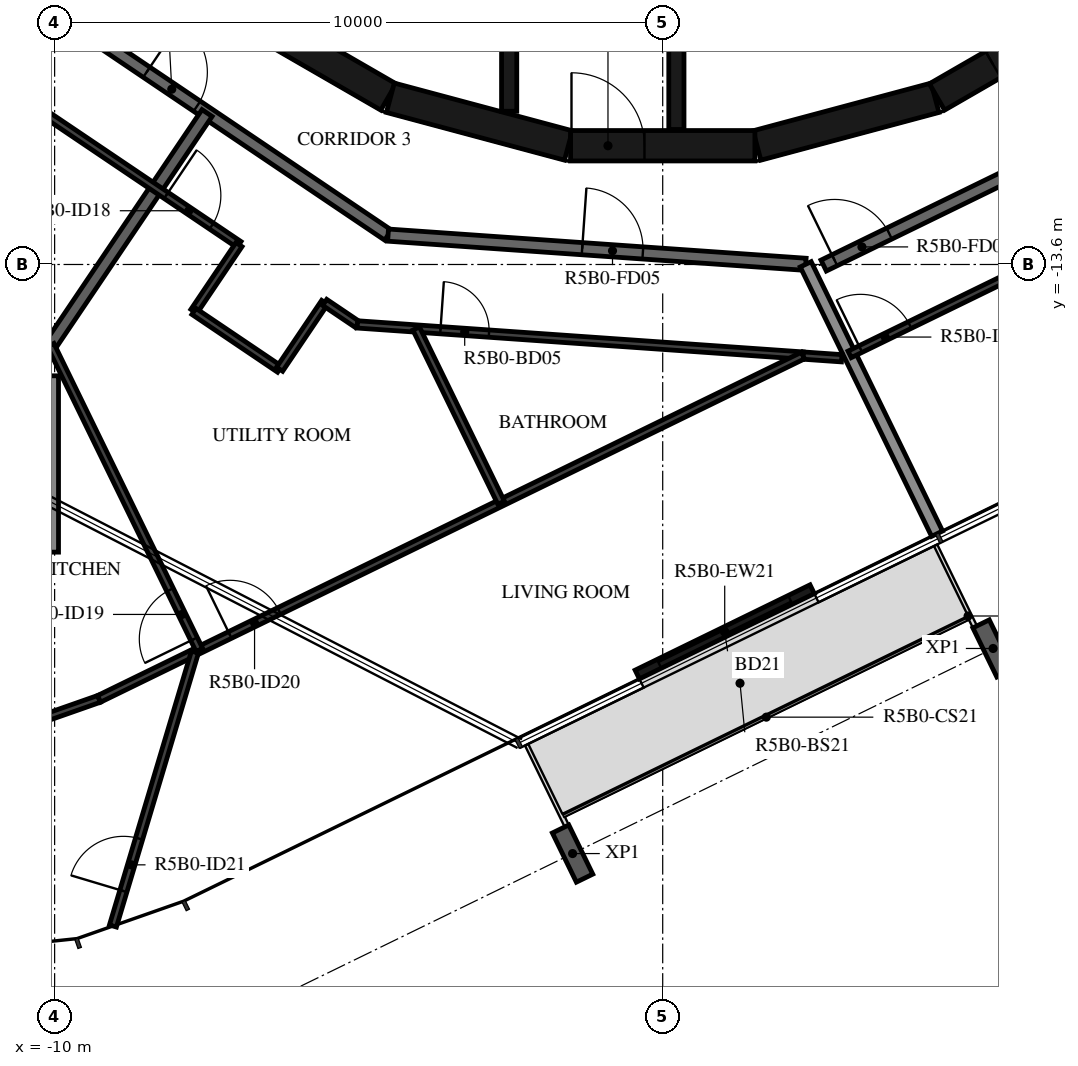
"""IFC4 building model, lengths in metres.
Left out: names, types, materials, properties, quantities, classifications, styles, units other than length and angle.
Written with IfcOpenShell. Run it as: python <this file> out.ifc"""

import sys

from ifc_helpers import new_model, si_unit, direction, frame, frame_2d, origin, origin_2d, place, context, subcontext, project, spatial, polyline, rectangle, i_section, outline, extrude, element, fill, save


model = new_model("IFC4")
c1 = context("Model", 3, precision=1e-05, world=origin(), true_north=direction((0.0, 1.0)))
c2 = subcontext(c1, "Body", "Model", "MODEL_VIEW")
j1 = project(units=[si_unit("LENGTHUNIT", "METRE"), si_unit("PLANEANGLEUNIT", "RADIAN")], contexts=[c1])
p1 = place(None, origin())
s1 = spatial("IfcSite", under=j1, at=p1, CompositionType="ELEMENT")
p2 = place(p1, origin())
s2 = spatial("IfcBuilding", under=s1, at=p2, CompositionType="ELEMENT")
p3 = place(p2, frame((0.0, 0.0, 202.4)))
s3 = spatial("IfcBuildingStorey", under=s2, at=p3, CompositionType="ELEMENT", Elevation=202.4)
for number, where, z_axis, x_axis in (
    (1, (-1.482, -23.287, -0.38), (0.0, 0.0, 1.0), (-0.899, -0.438, 0.0)),
    (2, (5.433, -19.915, -0.38), (0.0, 0.0, 1.0), (-0.899, -0.438, 0.0)),
):
    element("IfcColumn", number, at=place(p3, frame(where, z_axis=z_axis, x_axis=x_axis)), inside=s3, PredefinedType="COLUMN", context=c2, shape_type="SweptSolid", body=[
        extrude(i_section(OverallWidth=0.3, OverallDepth=0.9, WebThickness=0.019, FlangeThickness=0.035, FilletRadius=0.03, at=origin_2d()), origin(), (0.0, 0.0, 1.0), 3.5),
    ])
p4 = place(p3, frame((-0.418, -20.343, 0.0), z_axis=(0.0, 0.0, 1.0), x_axis=(0.898778711213, 0.43840258698, 0.0)))
e3 = element("IfcWall", 3, at=p4, inside=s3, PredefinedType="STANDARD", context=c2, shape_type="SweptSolid", body=[
    extrude(rectangle(XDim=3.2, YDim=0.16, at=frame_2d((1.6, 0.0))), origin(), (0.0, 0.0, 1.0), 3.12),
])
p5 = place(p4, frame((0.4, 0.0, 0.0)))
e4 = element("IfcOpeningElement", 4, at=p5, cuts=e3, PredefinedType="OPENING", context=c2, shape_type="SweptSolid", body=[
    extrude(rectangle(XDim=2.4, YDim=2.4, at=frame_2d((1.2, 1.2))), frame((0.0, 0.09, 0.0), z_axis=(0.0, -1.0, 0.0), x_axis=(1.0, 0.0, 0.0)), (0.0, 0.0, 1.0), 0.18),
])
p6 = place(p3, frame((1.55, -11.643, 0.0), z_axis=(0.0, 0.0, 1.0), x_axis=(0.965948410781, 0.258734743916, 0.0)))
e5 = element("IfcWall", 5, at=p6, inside=s3, PredefinedType="SHEAR", context=c2, shape_type="SweptSolid", body=[
    extrude(rectangle(XDim=3.033, YDim=0.5, at=frame_2d((1.516, 0.0))), origin(), (0.0, 0.0, 1.0), 3.12),
])
p7 = place(p3, frame((4.51, -10.845, 0.0), z_axis=(0.0, 0.0, 1.0), x_axis=(0.865975092491, 0.500087131594, 0.0)))
e6 = element("IfcWall", 6, at=p7, inside=s3, PredefinedType="SHEAR", context=c2, shape_type="SweptSolid", body=[
    extrude(rectangle(XDim=3.033, YDim=0.5, at=frame_2d((1.516, 0.0))), origin(), (0.0, 0.0, 1.0), 3.12),
])
p8 = place(p7, frame((1.066, 0.0, 0.0)))
e7 = element("IfcOpeningElement", 7, at=p8, cuts=e6, PredefinedType="OPENING", context=c2, shape_type="SweptSolid", body=[
    extrude(rectangle(XDim=0.9, YDim=2.1, at=frame_2d((0.45, 1.05))), frame((0.0, 0.26, 0.0), z_axis=(0.0, -1.0, 0.0), x_axis=(1.0, 0.0, 0.0)), (0.0, 0.0, 1.0), 0.52),
])
for number, where, z_axis, x_axis in (
    (8, (-7.137, -9.329, 0.0), (0.0, 0.0, 1.0), (0.866, -0.5, 0.0)),
    (9, (-4.479, -10.858, 0.0), (0.0, 0.0, 1.0), (0.966, -0.259, 0.0)),
):
    element("IfcWall", number, at=place(p3, frame(where, z_axis=z_axis, x_axis=x_axis)), inside=s3, PredefinedType="SHEAR", context=c2, shape_type="SweptSolid", body=[
        extrude(rectangle(XDim=3.033, YDim=0.5, at=frame_2d((1.516, 0.0))), origin(), (0.0, 0.0, 1.0), 3.12),
    ])
p9 = place(p3, frame((-1.516, -11.647, 0.0), z_axis=(0.0, 0.0, 1.0), x_axis=(1.0, 0.0, 0.0)))
e10 = element("IfcWall", 10, at=p9, inside=s3, PredefinedType="SHEAR", context=c2, shape_type="SweptSolid", body=[
    extrude(rectangle(XDim=3.033, YDim=0.5, at=frame_2d((1.516, 0.0))), origin(), (0.0, 0.0, 1.0), 3.12),
])
p10 = place(p9, frame((0.016, 0.0, 0.0)))
e11 = element("IfcOpeningElement", 11, at=p10, cuts=e10, PredefinedType="OPENING", context=c2, shape_type="SweptSolid", body=[
    extrude(rectangle(XDim=1.2, YDim=2.1, at=frame_2d((0.6, 1.05))), frame((0.0, 0.26, 0.0), z_axis=(0.0, -1.0, 0.0), x_axis=(1.0, 0.0, 0.0)), (0.0, 0.0, 1.0), 0.52),
])
p11 = place(p3, frame((-2.525, -8.97, 0.0), z_axis=(0.0, 0.0, 1.0), x_axis=(0.0, -1.0, 0.0)))
e12 = element("IfcWall", 12, at=p11, inside=s3, PredefinedType="SHEAR", context=c2, shape_type="SweptSolid", body=[
    extrude(rectangle(XDim=2.11, YDim=0.25, at=frame_2d((1.055, 0.0))), origin(), (0.0, 0.0, 1.0), 3.12),
])
p12 = place(p3, frame((0.225, -8.97, 0.0), z_axis=(0.0, 0.0, 1.0), x_axis=(0.0, -1.0, 0.0)))
e13 = element("IfcWall", 13, at=p12, inside=s3, PredefinedType="SHEAR", context=c2, shape_type="SweptSolid", body=[
    extrude(rectangle(XDim=2.41, YDim=0.25, at=frame_2d((1.205, 0.0))), origin(), (0.0, 0.0, 1.0), 3.12),
])
p13 = place(p3, frame((-10.47, -9.101, 0.0), z_axis=(0.0, 0.0, 1.0), x_axis=(0.829035841718, -0.559195469534, 0.0)))
e14 = element("IfcWall", 14, at=p13, inside=s3, PredefinedType="STANDARD", context=c2, shape_type="SweptSolid", body=[
    extrude(rectangle(XDim=7.181, YDim=0.2, at=frame_2d((3.591, 0.0))), origin(), (0.0, 0.0, 1.0), 3.12),
])
p14 = place(p13, frame((2.39, 0.0, 0.0)))
e15 = element("IfcOpeningElement", 15, at=p14, cuts=e14, PredefinedType="OPENING", context=c2, shape_type="SweptSolid", body=[
    extrude(rectangle(XDim=1.0, YDim=2.1, at=frame_2d((0.5, 1.05))), frame((0.0, 0.11, 0.0), z_axis=(0.0, -1.0, 0.0), x_axis=(1.0, 0.0, 0.0)), (0.0, 0.0, 1.0), 0.22),
])
p15 = place(p3, frame((-4.517, -13.117, 0.0), z_axis=(0.0, 0.0, 1.0), x_axis=(0.997564669554, -0.069747616856, 0.0)))
e16 = element("IfcWall", 16, at=p15, inside=s3, PredefinedType="STANDARD", context=c2, shape_type="SweptSolid", body=[
    extrude(rectangle(XDim=6.885, YDim=0.2, at=frame_2d((3.443, 0.0))), origin(), (0.0, 0.0, 1.0), 3.12),
])
p16 = place(p15, frame((3.2, 0.0, 0.0)))
e17 = element("IfcOpeningElement", 17, at=p16, cuts=e16, PredefinedType="OPENING", context=c2, shape_type="SweptSolid", body=[
    extrude(rectangle(XDim=1.0, YDim=2.1, at=frame_2d((0.5, 1.05))), frame((0.0, 0.11, 0.0), z_axis=(0.0, -1.0, 0.0), x_axis=(1.0, 0.0, 0.0)), (0.0, 0.0, 1.0), 0.22),
])
p17 = place(p3, frame((2.647, -13.618, 0.0), z_axis=(0.0, 0.0, 1.0), x_axis=(0.898796543751, 0.438366026218, 0.0)))
e18 = element("IfcWall", 18, at=p17, inside=s3, PredefinedType="STANDARD", context=c2, shape_type="SweptSolid", body=[
    extrude(rectangle(XDim=7.181, YDim=0.2, at=frame_2d((3.591, 0.0))), origin(), (0.0, 0.0, 1.0), 3.12),
])
p18 = place(p17, frame((0.2, 0.0, 0.0)))
e19 = element("IfcOpeningElement", 19, at=p18, cuts=e18, PredefinedType="OPENING", context=c2, shape_type="SweptSolid", body=[
    extrude(rectangle(XDim=1.0, YDim=2.1, at=frame_2d((0.5, 1.05))), frame((0.0, 0.11, 0.0), z_axis=(0.0, -1.0, 0.0), x_axis=(1.0, 0.0, 0.0)), (0.0, 0.0, 1.0), 0.22),
])
p19 = place(p3, frame((-10.066, -14.924, 0.0), z_axis=(0.0, 0.0, 1.0), x_axis=(0.559173899945, 0.829050390278, 0.0)))
e20 = element("IfcWall", 20, at=p19, inside=s3, PredefinedType="STANDARD", context=c2, shape_type="SweptSolid", body=[
    extrude(rectangle(XDim=4.601, YDim=0.2, at=frame_2d((2.301, 0.0))), origin(), (0.0, 0.0, 1.0), 3.12),
])
p20 = place(p3, frame((-10.408, -15.43, 0.0), z_axis=(0.0, 0.0, 1.0), x_axis=(0.559390561924, 0.828904215956, 0.0)))
e21 = element("IfcWall", 21, at=p20, inside=s3, PredefinedType="STANDARD", context=c2, shape_type="SweptSolid", body=[
    extrude(rectangle(XDim=0.612, YDim=0.2, at=frame_2d((0.306, 0.0))), origin(), (0.0, 0.0, 1.0), 3.12),
])
p21 = place(p3, frame((4.512, -18.027, 0.0), z_axis=(0.0, 0.0, 1.0), x_axis=(-0.438374835386, 0.898792247241, 0.0)))
e22 = element("IfcWall", 22, at=p21, inside=s3, PredefinedType="STANDARD", context=c2, shape_type="SweptSolid", body=[
    extrude(rectangle(XDim=4.929, YDim=0.2, at=frame_2d((2.464, 0.0))), origin(), (0.0, 0.0, 1.0), 2.73),
])
p22 = place(p3, frame((-11.642, -10.12, 0.0), z_axis=(0.0, 0.0, 1.0), x_axis=(0.829033377599, -0.559199122698, 0.0)))
e23 = element("IfcWall", 23, at=p22, inside=s3, PredefinedType="PARTITIONING", context=c2, shape_type="SweptSolid", body=[
    extrude(rectangle(XDim=5.638, YDim=0.12, at=frame_2d((2.819, 0.0))), origin(), (0.0, 0.0, 1.0), 3.12),
])
p23 = place(p22, frame((0.2, 0.0, 0.0)))
e24 = element("IfcOpeningElement", 24, at=p23, cuts=e23, PredefinedType="OPENING", context=c2, shape_type="SweptSolid", body=[
    extrude(rectangle(XDim=0.9, YDim=2.1, at=frame_2d((0.45, 1.05))), frame((0.0, 0.07, 0.0), z_axis=(0.0, -1.0, 0.0), x_axis=(1.0, 0.0, 0.0)), (0.0, 0.0, 1.0), 0.14),
])
p24 = place(p22, frame((4.192, 0.0, 0.0)))
e25 = element("IfcOpeningElement", 25, at=p24, cuts=e23, PredefinedType="OPENING", context=c2, shape_type="SweptSolid", body=[
    extrude(rectangle(XDim=0.9, YDim=2.1, at=frame_2d((0.45, 1.05))), frame((0.0, 0.07, 0.0), z_axis=(0.0, -1.0, 0.0), x_axis=(1.0, 0.0, 0.0)), (0.0, 0.0, 1.0), 0.14),
])
p25 = place(p3, frame((-6.968, -13.273, 0.0), z_axis=(0.0, 0.0, 1.0), x_axis=(-0.559283007371, -0.828976789582, 0.0)))
e26 = element("IfcWall", 26, at=p25, inside=s3, PredefinedType="PARTITIONING", context=c2, shape_type="SweptSolid", body=[
    extrude(rectangle(XDim=1.325, YDim=0.12, at=frame_2d((0.663, 0.0))), origin(), (0.0, 0.0, 1.0), 3.12),
])
p26 = place(p3, frame((-7.709, -14.371, 0.0), z_axis=(0.0, 0.0, 1.0), x_axis=(0.829033422808, -0.559199055675, 0.0)))
e27 = element("IfcWall", 27, at=p26, inside=s3, PredefinedType="PARTITIONING", context=c2, shape_type="SweptSolid", body=[
    extrude(rectangle(XDim=1.7, YDim=0.12, at=frame_2d((0.85, 0.0))), origin(), (0.0, 0.0, 1.0), 3.12),
])
p27 = place(p3, frame((-6.3, -15.322, 0.0), z_axis=(0.0, 0.0, 1.0), x_axis=(0.559197608403, 0.829034399019, 0.0)))
e28 = element("IfcWall", 28, at=p27, inside=s3, PredefinedType="PARTITIONING", context=c2, shape_type="SweptSolid", body=[
    extrude(rectangle(XDim=1.325, YDim=0.12, at=frame_2d((0.663, 0.0))), origin(), (0.0, 0.0, 1.0), 3.12),
])
p28 = place(p3, frame((-5.559, -14.223, 0.0), z_axis=(0.0, 0.0, 1.0), x_axis=(0.828844300469, -0.559479334363, 0.0)))
e29 = element("IfcWall", 29, at=p28, inside=s3, PredefinedType="PARTITIONING", context=c2, shape_type="SweptSolid", body=[
    extrude(rectangle(XDim=0.647, YDim=0.12, at=frame_2d((0.324, 0.0))), origin(), (0.0, 0.0, 1.0), 3.12),
])
p29 = place(p3, frame((-5.022, -14.585, 0.0), z_axis=(0.0, 0.0, 1.0), x_axis=(0.997564196041, -0.06975438895, 0.0)))
e30 = element("IfcWall", 30, at=p29, inside=s3, PredefinedType="PARTITIONING", context=c2, shape_type="SweptSolid", body=[
    extrude(rectangle(XDim=7.346, YDim=0.12, at=frame_2d((3.673, 0.0))), origin(), (0.0, 0.0, 1.0), 3.12),
])
p30 = place(p29, frame((1.37, 0.0, 0.0)))
e31 = element("IfcOpeningElement", 31, at=p30, cuts=e30, PredefinedType="OPENING", context=c2, shape_type="SweptSolid", body=[
    extrude(rectangle(XDim=0.8, YDim=2.1, at=frame_2d((0.4, 1.05))), frame((0.0, 0.07, 0.0), z_axis=(0.0, -1.0, 0.0), x_axis=(1.0, 0.0, 0.0)), (0.0, 0.0, 1.0), 0.14),
])
p31 = place(p3, frame((2.306, -15.098, 0.0), z_axis=(0.0, 0.0, 1.0), x_axis=(0.99757571817, -0.069589413839, 0.0)))
e32 = element("IfcWall", 32, at=p31, inside=s3, PredefinedType="PARTITIONING", context=c2, shape_type="SweptSolid", body=[
    extrude(rectangle(XDim=0.638, YDim=0.12, at=frame_2d((0.319, 0.0))), origin(), (0.0, 0.0, 1.0), 3.12),
])
p32 = place(p3, frame((-10.427, -21.149, 0.0), z_axis=(0.0, 0.0, 1.0), x_axis=(0.943591256744, 0.331112579338, 0.0)))
e33 = element("IfcWall", 33, at=p32, inside=s3, PredefinedType="PARTITIONING", context=c2, shape_type="SweptSolid", body=[
    extrude(rectangle(XDim=1.227, YDim=0.12, at=frame_2d((0.613, 0.0))), origin(), (0.0, 0.0, 1.0), 3.12),
])
p33 = place(p3, frame((-9.269, -20.743, 0.0), z_axis=(0.0, 0.0, 1.0), x_axis=(0.898796865831, 0.438365365846, 0.0)))
e34 = element("IfcWall", 34, at=p33, inside=s3, PredefinedType="PARTITIONING", context=c2, shape_type="SweptSolid", body=[
    extrude(rectangle(XDim=12.879, YDim=0.12, at=frame_2d((6.439, 0.0))), origin(), (0.0, 0.0, 1.0), 3.12),
])
p34 = place(p33, frame((2.395, 0.0, 0.0)))
e35 = element("IfcOpeningElement", 35, at=p34, cuts=e34, PredefinedType="OPENING", context=c2, shape_type="SweptSolid", body=[
    extrude(rectangle(XDim=0.9, YDim=2.1, at=frame_2d((0.45, 1.05))), frame((0.0, 0.07, 0.0), z_axis=(0.0, -1.0, 0.0), x_axis=(1.0, 0.0, 0.0)), (0.0, 0.0, 1.0), 0.14),
])
p35 = place(p3, frame((-7.62, -19.939, 0.0), z_axis=(0.0, 0.0, 1.0), x_axis=(-0.438353807908, 0.89880250283, 0.0)))
e36 = element("IfcWall", 36, at=p35, inside=s3, PredefinedType="PARTITIONING", context=c2, shape_type="SweptSolid", body=[
    extrude(rectangle(XDim=5.58, YDim=0.12, at=frame_2d((2.79, 0.0))), origin(), (0.0, 0.0, 1.0), 3.12),
])
p36 = place(p35, frame((0.2, 0.0, 0.0)))
e37 = element("IfcOpeningElement", 37, at=p36, cuts=e36, PredefinedType="OPENING", context=c2, shape_type="SweptSolid", body=[
    extrude(rectangle(XDim=0.9, YDim=2.1, at=frame_2d((0.45, 1.05))), frame((0.0, 0.07, 0.0), z_axis=(0.0, -1.0, 0.0), x_axis=(1.0, 0.0, 0.0)), (0.0, 0.0, 1.0), 0.14),
])
p37 = place(p3, frame((-9.041, -24.479, 0.0), z_axis=(0.0, 0.0, 1.0), x_axis=(0.286804727102, 0.957989064923, 0.0)))
e38 = element("IfcWall", 38, at=p37, inside=s3, PredefinedType="PARTITIONING", context=c2, shape_type="SweptSolid", body=[
    extrude(rectangle(XDim=4.701, YDim=0.12, at=frame_2d((2.351, 0.0))), origin(), (0.0, 0.0, 1.0), 3.12),
])
p38 = place(p37, frame((0.6, 0.0, 0.0)))
e39 = element("IfcOpeningElement", 39, at=p38, cuts=e38, PredefinedType="OPENING", context=c2, shape_type="SweptSolid", body=[
    extrude(rectangle(XDim=0.9, YDim=2.1, at=frame_2d((0.45, 1.05))), frame((0.0, 0.07, 0.0), z_axis=(0.0, -1.0, 0.0), x_axis=(1.0, 0.0, 0.0)), (0.0, 0.0, 1.0), 0.14),
])
p39 = place(p3, frame((-2.657, -17.518, 0.0), z_axis=(0.0, 0.0, 1.0), x_axis=(-0.438339139088, 0.898809656792, 0.0)))
e40 = element("IfcWall", 40, at=p39, inside=s3, PredefinedType="PARTITIONING", context=c2, shape_type="SweptSolid", body=[
    extrude(rectangle(XDim=3.188, YDim=0.12, at=frame_2d((1.594, 0.0))), origin(), (0.0, 0.0, 1.0), 3.12),
])
p40 = place(p3, frame((3.074, -15.078, 0.0), z_axis=(0.0, 0.0, 1.0), x_axis=(0.898793586225, 0.43837209008, 0.0)))
e41 = element("IfcWall", 41, at=p40, inside=s3, PredefinedType="PARTITIONING", context=c2, shape_type="SweptSolid", body=[
    extrude(rectangle(XDim=7.839, YDim=0.12, at=frame_2d((3.92, 0.0))), origin(), (0.0, 0.0, 1.0), 3.12),
])
p41 = place(p40, frame((0.2, 0.0, 0.0)))
e42 = element("IfcOpeningElement", 42, at=p41, cuts=e41, PredefinedType="OPENING", context=c2, shape_type="SweptSolid", body=[
    extrude(rectangle(XDim=0.9, YDim=2.1, at=frame_2d((0.45, 1.05))), frame((0.0, 0.07, 0.0), z_axis=(0.0, -1.0, 0.0), x_axis=(1.0, 0.0, 0.0)), (0.0, 0.0, 1.0), 0.14),
])
p42 = place(p3, origin())
e43 = element("IfcWall", 43, at=p42, inside=s3, PredefinedType="STANDARD", context=c2, shape_type="SweptSolid", body=[
    extrude(outline(polyline([(-9.936, -15.43), (-9.936, -18.331), (-12.836, -18.331), (-12.836, -15.43), (-9.936, -15.43)]), holes=[polyline([(-12.636, -18.131), (-10.136, -18.131), (-10.136, -15.631), (-12.636, -15.631), (-12.636, -18.131)])]), origin(), (0.0, 0.0, 1.0), 3.12),
])
p43 = place(p5, origin())
e44 = element("IfcDoor", 44, at=p43, inside=s3, OperationType="DOUBLE_DOOR_SLIDING", PredefinedType="DOOR", context=c2, shape_type="SweptSolid", body=[
    extrude(rectangle(XDim=2.4, YDim=2.4, at=frame_2d((1.2, 1.2))), frame((0.0, 0.025, 0.0), z_axis=(0.0, -1.0, 0.0), x_axis=(1.0, 0.0, 0.0)), (0.0, 0.0, 1.0), 0.05),
])
fill(e4, e44)
p44 = place(p10, origin())
e45 = element("IfcDoor", 45, at=p44, inside=s3, OperationType="SINGLE_SWING_RIGHT", PredefinedType="DOOR", context=c2, shape_type="SweptSolid", body=[
    extrude(rectangle(XDim=1.2, YDim=2.1, at=frame_2d((0.6, 1.05))), frame((0.0, 0.025, 0.0), z_axis=(0.0, -1.0, 0.0), x_axis=(1.0, 0.0, 0.0)), (0.0, 0.0, 1.0), 0.05),
])
fill(e11, e45)
p45 = place(p8, origin())
e46 = element("IfcDoor", 46, at=p45, inside=s3, OperationType="SINGLE_SWING_RIGHT", PredefinedType="DOOR", context=c2, shape_type="SweptSolid", body=[
    extrude(rectangle(XDim=0.9, YDim=2.1, at=frame_2d((0.45, 1.05))), frame((0.0, 0.025, 0.0), z_axis=(0.0, -1.0, 0.0), x_axis=(1.0, 0.0, 0.0)), (0.0, 0.0, 1.0), 0.05),
])
fill(e7, e46)
p46 = place(p14, origin())
e47 = element("IfcDoor", 47, at=p46, inside=s3, OperationType="SINGLE_SWING_RIGHT", PredefinedType="DOOR", context=c2, shape_type="SweptSolid", body=[
    extrude(rectangle(XDim=1.0, YDim=2.1, at=frame_2d((0.5, 1.05))), frame((0.0, 0.025, 0.0), z_axis=(0.0, -1.0, 0.0), x_axis=(1.0, 0.0, 0.0)), (0.0, 0.0, 1.0), 0.05),
])
fill(e15, e47)
p47 = place(p16, origin())
e48 = element("IfcDoor", 48, at=p47, inside=s3, OperationType="SINGLE_SWING_LEFT", PredefinedType="DOOR", context=c2, shape_type="SweptSolid", body=[
    extrude(rectangle(XDim=1.0, YDim=2.1, at=frame_2d((0.5, 1.05))), frame((0.0, 0.025, 0.0), z_axis=(0.0, -1.0, 0.0), x_axis=(1.0, 0.0, 0.0)), (0.0, 0.0, 1.0), 0.05),
])
fill(e17, e48)
p48 = place(p24, origin())
e49 = element("IfcDoor", 49, at=p48, inside=s3, OperationType="SINGLE_SWING_LEFT", PredefinedType="DOOR", context=c2, shape_type="SweptSolid", body=[
    extrude(rectangle(XDim=0.9, YDim=2.1, at=frame_2d((0.45, 1.05))), frame((0.0, 0.025, 0.0), z_axis=(0.0, -1.0, 0.0), x_axis=(1.0, 0.0, 0.0)), (0.0, 0.0, 1.0), 0.05),
])
fill(e25, e49)
p49 = place(p30, origin())
e50 = element("IfcDoor", 50, at=p49, inside=s3, OperationType="SINGLE_SWING_LEFT", PredefinedType="DOOR", context=c2, shape_type="SweptSolid", body=[
    extrude(rectangle(XDim=0.8, YDim=2.1, at=frame_2d((0.4, 1.05))), frame((0.0, 0.025, 0.0), z_axis=(0.0, -1.0, 0.0), x_axis=(1.0, 0.0, 0.0)), (0.0, 0.0, 1.0), 0.05),
])
fill(e31, e50)
p50 = place(p36, origin())
e51 = element("IfcDoor", 51, at=p50, inside=s3, OperationType="SINGLE_SWING_LEFT", PredefinedType="DOOR", context=c2, shape_type="SweptSolid", body=[
    extrude(rectangle(XDim=0.9, YDim=2.1, at=frame_2d((0.45, 1.05))), frame((0.0, 0.025, 0.0), z_axis=(0.0, -1.0, 0.0), x_axis=(1.0, 0.0, 0.0)), (0.0, 0.0, 1.0), 0.05),
])
fill(e37, e51)
p51 = place(p34, origin())
e52 = element("IfcDoor", 52, at=p51, inside=s3, OperationType="SINGLE_SWING_LEFT", PredefinedType="DOOR", context=c2, shape_type="SweptSolid", body=[
    extrude(rectangle(XDim=0.9, YDim=2.1, at=frame_2d((0.45, 1.05))), frame((0.0, 0.025, 0.0), z_axis=(0.0, -1.0, 0.0), x_axis=(1.0, 0.0, 0.0)), (0.0, 0.0, 1.0), 0.05),
])
fill(e35, e52)
p52 = place(p38, origin())
e53 = element("IfcDoor", 53, at=p52, inside=s3, OperationType="SINGLE_SWING_LEFT", PredefinedType="DOOR", context=c2, shape_type="SweptSolid", body=[
    extrude(rectangle(XDim=0.9, YDim=2.1, at=frame_2d((0.45, 1.05))), frame((0.0, 0.025, 0.0), z_axis=(0.0, -1.0, 0.0), x_axis=(1.0, 0.0, 0.0)), (0.0, 0.0, 1.0), 0.05),
])
fill(e39, e53)
p53 = place(p18, origin())
e54 = element("IfcDoor", 54, at=p53, inside=s3, OperationType="SINGLE_SWING_LEFT", PredefinedType="DOOR", context=c2, shape_type="SweptSolid", body=[
    extrude(rectangle(XDim=1.0, YDim=2.1, at=frame_2d((0.5, 1.05))), frame((0.0, 0.025, 0.0), z_axis=(0.0, -1.0, 0.0), x_axis=(1.0, 0.0, 0.0)), (0.0, 0.0, 1.0), 0.05),
])
fill(e19, e54)
p54 = place(p41, origin())
e55 = element("IfcDoor", 55, at=p54, inside=s3, OperationType="SINGLE_SWING_LEFT", PredefinedType="DOOR", context=c2, shape_type="SweptSolid", body=[
    extrude(rectangle(XDim=0.9, YDim=2.1, at=frame_2d((0.45, 1.05))), frame((0.0, 0.025, 0.0), z_axis=(0.0, -1.0, 0.0), x_axis=(1.0, 0.0, 0.0)), (0.0, 0.0, 1.0), 0.05),
])
fill(e42, e55)
save(model, sys.argv[1])
